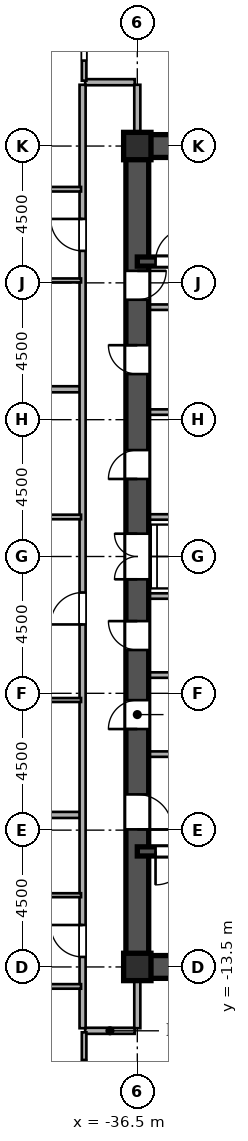
"""IFC4 building model, lengths in metres.
Left out: names, types, materials, properties, quantities, classifications, styles, units other than length and angle.
Written with IfcOpenShell. Run it as: python <this file> out.ifc"""

import sys

from ifc_helpers import new_model, si_unit, direction, frame, frame_2d, origin, origin_2d, place, context, subcontext, project, spatial, rectangle, i_section, extrude, source, transform, mapped, element, fill, save


model = new_model("IFC4")
c1 = context("Model", 3, precision=1e-05, world=origin(), true_north=direction((0.0, 1.0)))
c2 = subcontext(c1, "Body", "Model", "MODEL_VIEW")
j1 = project(units=[si_unit("LENGTHUNIT", "METRE"), si_unit("PLANEANGLEUNIT", "RADIAN")], contexts=[c1])
p1 = place(None, origin())
s1 = spatial("IfcSite", under=j1, at=p1, CompositionType="ELEMENT")
p2 = place(p1, origin())
s2 = spatial("IfcBuilding", under=s1, at=p2, CompositionType="ELEMENT")
p3 = place(p2, frame((0.0, 0.0, 51.3)))
s3 = spatial("IfcBuildingStorey", under=s2, at=p3, CompositionType="ELEMENT", Elevation=51.3)
m1 = source(origin(), c2, "Body", "SweptSolid", [
    extrude(i_section(OverallWidth=0.9, OverallDepth=0.9, WebThickness=0.036, FlangeThickness=0.055, at=origin_2d()), origin(), (0.0, 0.0, 1.0), 3.6),
])
for number, where, z_axis, x_axis in (
    (1, (-36.5, -13.5, 0.0), (0.0, 0.0, 1.0), (1.0, 0.0, 0.0)),
    (2, (-36.5, 13.5, 0.0), (0.0, 0.0, 1.0), (1.0, 0.0, 0.0)),
):
    element("IfcColumn", number, at=place(p3, frame(where, z_axis=z_axis, x_axis=x_axis)), inside=s3, PredefinedType="COLUMN", context=c2, shape_type="MappedRepresentation", body=[
        mapped(m1, transform((0.0, 0.0, 0.0), scale=1.0)),
    ])
for number, where, z_axis, x_axis in (
    (3, (-36.5, -13.5, 0.0), (0.0, 0.0, 1.0), (1.0, 0.0, 0.0)),
    (4, (-36.5, 13.5, 0.0), (0.0, 0.0, 1.0), (1.0, 0.0, 0.0)),
):
    element("IfcWall", number, at=place(p3, frame(where, z_axis=z_axis, x_axis=x_axis)), inside=s3, PredefinedType="SHEAR", context=c2, shape_type="SweptSolid", body=[
        extrude(rectangle(XDim=9.0, YDim=0.75, at=frame_2d((4.5, 0.0))), origin(), (0.0, 0.0, 1.0), 3.38),
    ])
p4 = place(p3, frame((-36.5, -13.65, 0.0), z_axis=(0.0, 0.0, 1.0), x_axis=(0.0, 1.0, 0.0)))
e5 = element("IfcWall", 5, at=p4, inside=s3, PredefinedType="SHEAR", context=c2, shape_type="SweptSolid", body=[
    extrude(rectangle(XDim=7.15, YDim=0.75, at=frame_2d((3.575, 0.0))), origin(), (0.0, 0.0, 1.0), 3.38),
])
p5 = place(p4, frame((4.675, 0.0, 0.0)))
e6 = element("IfcOpeningElement", 6, at=p5, cuts=e5, PredefinedType="OPENING", context=c2, shape_type="SweptSolid", body=[
    extrude(rectangle(XDim=1.15, YDim=2.2, at=frame_2d((0.575, 1.1))), frame((0.0, 0.385, 0.0), z_axis=(0.0, -1.0, 0.0), x_axis=(1.0, 0.0, 0.0)), (0.0, 0.0, 1.0), 0.77),
])
p6 = place(p3, frame((-36.5, -1.3, 0.0), z_axis=(0.0, 0.0, 1.0), x_axis=(0.0, 1.0, 0.0)))
e7 = element("IfcWall", 7, at=p6, inside=s3, PredefinedType="SHEAR", context=c2, shape_type="SweptSolid", body=[
    extrude(rectangle(XDim=2.6, YDim=0.75, at=frame_2d((1.3, 0.0))), origin(), (0.0, 0.0, 1.0), 3.38),
])
p7 = place(p6, frame((0.55, 0.0, 0.0)))
e8 = element("IfcOpeningElement", 8, at=p7, cuts=e7, PredefinedType="OPENING", context=c2, shape_type="SweptSolid", body=[
    extrude(rectangle(XDim=1.5, YDim=2.3, at=frame_2d((0.75, 1.15))), frame((0.0, 0.385, 0.0), z_axis=(0.0, -1.0, 0.0), x_axis=(1.0, 0.0, 0.0)), (0.0, 0.0, 1.0), 0.77),
])
p8 = place(p3, frame((-36.5, 8.2, 0.0), z_axis=(0.0, 0.0, 1.0), x_axis=(0.0, 1.0, 0.0)))
e9 = element("IfcWall", 9, at=p8, inside=s3, PredefinedType="SHEAR", context=c2, shape_type="SweptSolid", body=[
    extrude(rectangle(XDim=5.45, YDim=0.75, at=frame_2d((2.725, 0.0))), origin(), (0.0, 0.0, 1.0), 3.38),
])
p9 = place(p8, frame((0.245, 0.0, 0.0)))
e10 = element("IfcOpeningElement", 10, at=p9, cuts=e9, PredefinedType="OPENING", context=c2, shape_type="SweptSolid", body=[
    extrude(rectangle(XDim=0.95, YDim=2.15, at=frame_2d((0.475, 1.075))), frame((0.0, 0.385, 0.0), z_axis=(0.0, -1.0, 0.0), x_axis=(1.0, 0.0, 0.0)), (0.0, 0.0, 1.0), 0.77),
])
p10 = place(p3, frame((-36.5, -6.5, 0.0), z_axis=(0.0, 0.0, 1.0), x_axis=(0.0, 1.0, 0.0)))
e11 = element("IfcWall", 11, at=p10, inside=s3, PredefinedType="SHEAR", context=c2, shape_type="SweptSolid", body=[
    extrude(rectangle(XDim=2.6, YDim=0.75, at=frame_2d((1.3, 0.0))), origin(), (0.0, 0.0, 1.0), 3.38),
])
p11 = place(p10, frame((0.825, 0.0, 0.0)))
e12 = element("IfcOpeningElement", 12, at=p11, cuts=e11, PredefinedType="OPENING", context=c2, shape_type="SweptSolid", body=[
    extrude(rectangle(XDim=0.95, YDim=2.15, at=frame_2d((0.475, 1.075))), frame((0.0, 0.385, 0.0), z_axis=(0.0, -1.0, 0.0), x_axis=(1.0, 0.0, 0.0)), (0.0, 0.0, 1.0), 0.77),
])
p12 = place(p3, frame((-36.5, -3.9, 0.0), z_axis=(0.0, 0.0, 1.0), x_axis=(0.0, 1.0, 0.0)))
e13 = element("IfcWall", 13, at=p12, inside=s3, PredefinedType="SHEAR", context=c2, shape_type="SweptSolid", body=[
    extrude(rectangle(XDim=2.6, YDim=0.75, at=frame_2d((1.3, 0.0))), origin(), (0.0, 0.0, 1.0), 3.38),
])
p13 = place(p12, frame((0.825, 0.0, 0.0)))
e14 = element("IfcOpeningElement", 14, at=p13, cuts=e13, PredefinedType="OPENING", context=c2, shape_type="SweptSolid", body=[
    extrude(rectangle(XDim=0.95, YDim=2.15, at=frame_2d((0.475, 1.075))), frame((0.0, 0.385, 0.0), z_axis=(0.0, -1.0, 0.0), x_axis=(1.0, 0.0, 0.0)), (0.0, 0.0, 1.0), 0.77),
])
p14 = place(p3, frame((-36.5, 1.3, 0.0), z_axis=(0.0, 0.0, 1.0), x_axis=(0.0, 1.0, 0.0)))
e15 = element("IfcWall", 15, at=p14, inside=s3, PredefinedType="SHEAR", context=c2, shape_type="SweptSolid", body=[
    extrude(rectangle(XDim=3.45, YDim=0.75, at=frame_2d((1.725, 0.0))), origin(), (0.0, 0.0, 1.0), 3.38),
])
p15 = place(p14, frame((1.25, 0.0, 0.0)))
e16 = element("IfcOpeningElement", 16, at=p15, cuts=e15, PredefinedType="OPENING", context=c2, shape_type="SweptSolid", body=[
    extrude(rectangle(XDim=0.95, YDim=2.15, at=frame_2d((0.475, 1.075))), frame((0.0, 0.385, 0.0), z_axis=(0.0, -1.0, 0.0), x_axis=(1.0, 0.0, 0.0)), (0.0, 0.0, 1.0), 0.77),
])
p16 = place(p3, frame((-36.5, 4.75, 0.0), z_axis=(0.0, 0.0, 1.0), x_axis=(0.0, 1.0, 0.0)))
e17 = element("IfcWall", 17, at=p16, inside=s3, PredefinedType="SHEAR", context=c2, shape_type="SweptSolid", body=[
    extrude(rectangle(XDim=3.45, YDim=0.75, at=frame_2d((1.725, 0.0))), origin(), (0.0, 0.0, 1.0), 3.38),
])
p17 = place(p16, frame((1.25, 0.0, 0.0)))
e18 = element("IfcOpeningElement", 18, at=p17, cuts=e17, PredefinedType="OPENING", context=c2, shape_type="SweptSolid", body=[
    extrude(rectangle(XDim=0.95, YDim=2.15, at=frame_2d((0.475, 1.075))), frame((0.0, 0.385, 0.0), z_axis=(0.0, -1.0, 0.0), x_axis=(1.0, 0.0, 0.0)), (0.0, 0.0, 1.0), 0.77),
])
p18 = place(p3, frame((-36.5, -9.7, 0.0), z_axis=(0.0, 0.0, 1.0), x_axis=(1.0, 0.0, 0.0)))
e19 = element("IfcWall", 19, at=p18, inside=s3, PredefinedType="SHEAR", context=c2, shape_type="SweptSolid", body=[
    extrude(rectangle(XDim=9.0, YDim=0.3, at=frame_2d((4.5, 0.0))), origin(), (0.0, 0.0, 1.0), 3.38),
])
p19 = place(p18, frame((0.6, 0.0, 0.0)))
e20 = element("IfcOpeningElement", 20, at=p19, cuts=e19, PredefinedType="OPENING", context=c2, shape_type="SweptSolid", body=[
    extrude(rectangle(XDim=1.1, YDim=2.2, at=frame_2d((0.55, 1.1))), frame((0.0, 0.16, 0.0), z_axis=(0.0, -1.0, 0.0), x_axis=(1.0, 0.0, 0.0)), (0.0, 0.0, 1.0), 0.32),
])
p20 = place(p3, frame((-36.5, 9.7, 0.0), z_axis=(0.0, 0.0, 1.0), x_axis=(1.0, 0.0, 0.0)))
e21 = element("IfcWall", 21, at=p20, inside=s3, PredefinedType="SHEAR", context=c2, shape_type="SweptSolid", body=[
    extrude(rectangle(XDim=9.0, YDim=0.3, at=frame_2d((4.5, 0.0))), origin(), (0.0, 0.0, 1.0), 3.38),
])
p21 = place(p20, frame((0.6, 0.0, 0.0)))
e22 = element("IfcOpeningElement", 22, at=p21, cuts=e21, PredefinedType="OPENING", context=c2, shape_type="SweptSolid", body=[
    extrude(rectangle(XDim=1.1, YDim=2.2, at=frame_2d((0.55, 1.1))), frame((0.0, 0.16, 0.0), z_axis=(0.0, -1.0, 0.0), x_axis=(1.0, 0.0, 0.0)), (0.0, 0.0, 1.0), 0.32),
])
for number, where, z_axis, x_axis in (
    (23, (-36.15, -6.5, 0.0), (0.0, 0.0, 1.0), (1.0, 0.0, 0.0)),
    (24, (-36.15, 8.2, 0.0), (0.0, 0.0, 1.0), (1.0, 0.0, 0.0)),
):
    element("IfcWall", number, at=place(p3, frame(where, z_axis=z_axis, x_axis=x_axis)), inside=s3, PredefinedType="PARTITIONING", context=c2, shape_type="SweptSolid", body=[
        extrude(rectangle(XDim=5.7, YDim=0.18, at=frame_2d((2.85, 0.0))), origin(), (0.0, 0.0, 1.0), 3.38),
    ])
for number, where, z_axis, x_axis in (
    (25, (-36.15, -1.3, 0.0), (0.0, 0.0, 1.0), (1.0, 0.0, 0.0)),
    (26, (-36.15, 1.3, 0.0), (0.0, 0.0, 1.0), (1.0, 0.0, 0.0)),
    (27, (-36.15, -3.9, 0.0), (0.0, 0.0, 1.0), (1.0, 0.0, 0.0)),
    (28, (-36.15, 4.75, 0.0), (0.0, 0.0, 1.0), (1.0, 0.0, 0.0)),
):
    element("IfcWall", number, at=place(p3, frame(where, z_axis=z_axis, x_axis=x_axis)), inside=s3, PredefinedType="PARTITIONING", context=c2, shape_type="SweptSolid", body=[
        extrude(rectangle(XDim=2.95, YDim=0.18, at=frame_2d((1.475, 0.0))), origin(), (0.0, 0.0, 1.0), 3.38),
    ])
p22 = place(p3, frame((-38.215, -15.6, 0.0), z_axis=(0.0, 0.0, 1.0), x_axis=(1.0, 0.0, 0.0)))
e29 = element("IfcWall", 29, at=p22, inside=s3, PredefinedType="PARTITIONING", context=c2, shape_type="SweptSolid", body=[
    extrude(rectangle(XDim=1.63, YDim=0.2, at=frame_2d((0.815, 0.0))), origin(), (0.0, 0.0, 1.0), 3.38),
])
p23 = place(p3, frame((-44.45, -14.14, 0.0), z_axis=(0.0, 0.0, 1.0), x_axis=(1.0, 0.0, 0.0)))
e30 = element("IfcWall", 30, at=p23, inside=s3, PredefinedType="PARTITIONING", context=c2, shape_type="SweptSolid", body=[
    extrude(rectangle(XDim=6.1, YDim=0.15, at=frame_2d((3.05, 0.0))), origin(), (0.0, 0.0, 1.0), 3.38),
])
p24 = place(p23, frame((2.575, 0.0, 0.0)))
e31 = element("IfcOpeningElement", 31, at=p24, cuts=e30, PredefinedType="OPENING", context=c2, shape_type="SweptSolid", body=[
    extrude(rectangle(XDim=0.95, YDim=2.15, at=frame_2d((0.475, 1.075))), frame((0.0, 0.085, 0.0), z_axis=(0.0, -1.0, 0.0), x_axis=(1.0, 0.0, 0.0)), (0.0, 0.0, 1.0), 0.17),
])
p25 = place(p3, frame((-44.45, -11.14, 0.0), z_axis=(0.0, 0.0, 1.0), x_axis=(1.0, 0.0, 0.0)))
e32 = element("IfcWall", 32, at=p25, inside=s3, PredefinedType="PARTITIONING", context=c2, shape_type="SweptSolid", body=[
    extrude(rectangle(XDim=6.1, YDim=0.13, at=frame_2d((3.05, 0.0))), origin(), (0.0, 0.0, 1.0), 3.38),
])
p26 = place(p25, frame((2.61, 0.0, 0.0)))
e33 = element("IfcOpeningElement", 33, at=p26, cuts=e32, PredefinedType="OPENING", context=c2, shape_type="SweptSolid", body=[
    extrude(rectangle(XDim=0.88, YDim=2.1, at=frame_2d((0.44, 1.05))), frame((0.0, 0.075, 0.0), z_axis=(0.0, -1.0, 0.0), x_axis=(1.0, 0.0, 0.0)), (0.0, 0.0, 1.0), 0.15),
])
p27 = place(p3, frame((-72.505, -8.5, 0.0), z_axis=(0.0, 0.0, 1.0), x_axis=(1.0, 0.0, 0.0)))
e34 = element("IfcWall", 34, at=p27, inside=s3, PredefinedType="PARTITIONING", context=c2, shape_type="SweptSolid", body=[
    extrude(rectangle(XDim=34.125, YDim=0.2, at=frame_2d((17.062, 0.0))), origin(), (0.0, 0.0, 1.0), 3.38),
])
p28 = place(p3, frame((-44.45, -4.72, 0.0), z_axis=(0.0, 0.0, 1.0), x_axis=(1.0, 0.0, 0.0)))
e35 = element("IfcWall", 35, at=p28, inside=s3, PredefinedType="PARTITIONING", context=c2, shape_type="SweptSolid", body=[
    extrude(rectangle(XDim=6.1, YDim=0.13, at=frame_2d((3.05, 0.0))), origin(), (0.0, 0.0, 1.0), 3.38),
])
p29 = place(p28, frame((2.61, 0.0, 0.0)))
e36 = element("IfcOpeningElement", 36, at=p29, cuts=e35, PredefinedType="OPENING", context=c2, shape_type="SweptSolid", body=[
    extrude(rectangle(XDim=0.88, YDim=2.1, at=frame_2d((0.44, 1.05))), frame((0.0, 0.075, 0.0), z_axis=(0.0, -1.0, 0.0), x_axis=(1.0, 0.0, 0.0)), (0.0, 0.0, 1.0), 0.15),
])
p30 = place(p3, frame((-44.45, 1.3, 0.0), z_axis=(0.0, 0.0, 1.0), x_axis=(1.0, 0.0, 0.0)))
e37 = element("IfcWall", 37, at=p30, inside=s3, PredefinedType="PARTITIONING", context=c2, shape_type="SweptSolid", body=[
    extrude(rectangle(XDim=6.1, YDim=0.15, at=frame_2d((3.05, 0.0))), origin(), (0.0, 0.0, 1.0), 3.38),
])
p31 = place(p30, frame((2.575, 0.0, 0.0)))
e38 = element("IfcOpeningElement", 38, at=p31, cuts=e37, PredefinedType="OPENING", context=c2, shape_type="SweptSolid", body=[
    extrude(rectangle(XDim=0.95, YDim=2.15, at=frame_2d((0.475, 1.075))), frame((0.0, 0.085, 0.0), z_axis=(0.0, -1.0, 0.0), x_axis=(1.0, 0.0, 0.0)), (0.0, 0.0, 1.0), 0.17),
])
p32 = place(p3, frame((-72.505, 5.5, 0.0), z_axis=(0.0, 0.0, 1.0), x_axis=(1.0, 0.0, 0.0)))
e39 = element("IfcWall", 39, at=p32, inside=s3, PredefinedType="PARTITIONING", context=c2, shape_type="SweptSolid", body=[
    extrude(rectangle(XDim=34.125, YDim=0.2, at=frame_2d((17.062, 0.0))), origin(), (0.0, 0.0, 1.0), 3.38),
])
p33 = place(p3, frame((-44.45, 9.08, 0.0), z_axis=(0.0, 0.0, 1.0), x_axis=(1.0, 0.0, 0.0)))
e40 = element("IfcWall", 40, at=p33, inside=s3, PredefinedType="PARTITIONING", context=c2, shape_type="SweptSolid", body=[
    extrude(rectangle(XDim=6.1, YDim=0.13, at=frame_2d((3.05, 0.0))), origin(), (0.0, 0.0, 1.0), 3.38),
])
p34 = place(p33, frame((2.61, 0.0, 0.0)))
e41 = element("IfcOpeningElement", 41, at=p34, cuts=e40, PredefinedType="OPENING", context=c2, shape_type="SweptSolid", body=[
    extrude(rectangle(XDim=0.88, YDim=2.1, at=frame_2d((0.44, 1.05))), frame((0.0, 0.075, 0.0), z_axis=(0.0, -1.0, 0.0), x_axis=(1.0, 0.0, 0.0)), (0.0, 0.0, 1.0), 0.15),
])
p35 = place(p3, frame((-44.45, 12.08, 0.0), z_axis=(0.0, 0.0, 1.0), x_axis=(1.0, 0.0, 0.0)))
e42 = element("IfcWall", 42, at=p35, inside=s3, PredefinedType="PARTITIONING", context=c2, shape_type="SweptSolid", body=[
    extrude(rectangle(XDim=6.1, YDim=0.15, at=frame_2d((3.05, 0.0))), origin(), (0.0, 0.0, 1.0), 3.38),
])
p36 = place(p35, frame((2.575, 0.0, 0.0)))
e43 = element("IfcOpeningElement", 43, at=p36, cuts=e42, PredefinedType="OPENING", context=c2, shape_type="SweptSolid", body=[
    extrude(rectangle(XDim=0.95, YDim=2.15, at=frame_2d((0.475, 1.075))), frame((0.0, 0.085, 0.0), z_axis=(0.0, -1.0, 0.0), x_axis=(1.0, 0.0, 0.0)), (0.0, 0.0, 1.0), 0.17),
])
p37 = place(p3, frame((-38.215, 15.6, 0.0), z_axis=(0.0, 0.0, 1.0), x_axis=(1.0, 0.0, 0.0)))
e44 = element("IfcWall", 44, at=p37, inside=s3, PredefinedType="PARTITIONING", context=c2, shape_type="SweptSolid", body=[
    extrude(rectangle(XDim=1.63, YDim=0.2, at=frame_2d((0.815, 0.0))), origin(), (0.0, 0.0, 1.0), 3.38),
])
p38 = place(p3, frame((-38.3, -15.515, 0.0), z_axis=(0.0, 0.0, 1.0), x_axis=(0.0, 1.0, 0.0)))
e45 = element("IfcWall", 45, at=p38, inside=s3, PredefinedType="PARTITIONING", context=c2, shape_type="SweptSolid", body=[
    extrude(rectangle(XDim=31.03, YDim=0.2, at=frame_2d((15.515, 0.0))), origin(), (0.0, 0.0, 1.0), 3.38),
])
p39 = place(p38, frame((2.345, 0.0, 0.0)))
e46 = element("IfcOpeningElement", 46, at=p39, cuts=e45, PredefinedType="OPENING", context=c2, shape_type="SweptSolid", body=[
    extrude(rectangle(XDim=1.05, YDim=2.25, at=frame_2d((0.525, 1.125))), frame((0.0, 0.11, 0.0), z_axis=(0.0, -1.0, 0.0), x_axis=(1.0, 0.0, 0.0)), (0.0, 0.0, 1.0), 0.22),
])
p40 = place(p38, frame((13.28, 0.0, 0.0)))
e47 = element("IfcOpeningElement", 47, at=p40, cuts=e45, PredefinedType="OPENING", context=c2, shape_type="SweptSolid", body=[
    extrude(rectangle(XDim=1.05, YDim=2.25, at=frame_2d((0.525, 1.125))), frame((0.0, 0.11, 0.0), z_axis=(0.0, -1.0, 0.0), x_axis=(1.0, 0.0, 0.0)), (0.0, 0.0, 1.0), 0.22),
])
p41 = place(p38, frame((25.567, 0.0, 0.0)))
e48 = element("IfcOpeningElement", 48, at=p41, cuts=e45, PredefinedType="OPENING", context=c2, shape_type="SweptSolid", body=[
    extrude(rectangle(XDim=1.05, YDim=2.25, at=frame_2d((0.525, 1.125))), frame((0.0, 0.11, 0.0), z_axis=(0.0, -1.0, 0.0), x_axis=(1.0, 0.0, 0.0)), (0.0, 0.0, 1.0), 0.22),
])
p42 = place(p3, frame((-38.25, -23.898, 0.0), z_axis=(0.0, 0.0, 1.0), x_axis=(0.0, 1.0, 0.0)))
e49 = element("IfcWall", 49, at=p42, inside=s3, PredefinedType="PARTITIONING", context=c2, shape_type="SweptSolid", body=[
    extrude(rectangle(XDim=8.248, YDim=0.15, at=frame_2d((4.124, 0.0))), origin(), (0.0, 0.0, 1.0), 3.38),
])
p43 = place(p42, frame((6.391, 0.0, 0.0)))
e50 = element("IfcOpeningElement", 50, at=p43, cuts=e49, PredefinedType="OPENING", context=c2, shape_type="SweptSolid", body=[
    extrude(rectangle(XDim=0.95, YDim=2.15, at=frame_2d((0.475, 1.075))), frame((0.0, 0.085, 0.0), z_axis=(0.0, -1.0, 0.0), x_axis=(1.0, 0.0, 0.0)), (0.0, 0.0, 1.0), 0.17),
])
p44 = place(p3, frame((-38.25, 15.65, 0.0), z_axis=(0.0, 0.0, 1.0), x_axis=(0.0, 1.0, 0.0)))
e51 = element("IfcWall", 51, at=p44, inside=s3, PredefinedType="PARTITIONING", context=c2, shape_type="SweptSolid", body=[
    extrude(rectangle(XDim=8.248, YDim=0.15, at=frame_2d((4.124, 0.0))), origin(), (0.0, 0.0, 1.0), 3.38),
])
p45 = place(p44, frame((0.66, 0.0, 0.0)))
e52 = element("IfcOpeningElement", 52, at=p45, cuts=e51, PredefinedType="OPENING", context=c2, shape_type="SweptSolid", body=[
    extrude(rectangle(XDim=0.95, YDim=2.15, at=frame_2d((0.475, 1.075))), frame((0.0, 0.085, 0.0), z_axis=(0.0, -1.0, 0.0), x_axis=(1.0, 0.0, 0.0)), (0.0, 0.0, 1.0), 0.17),
])
p46 = place(p44, frame((2.985, 0.0, 0.0)))
e53 = element("IfcOpeningElement", 53, at=p46, cuts=e51, PredefinedType="OPENING", context=c2, shape_type="SweptSolid", body=[
    extrude(rectangle(XDim=0.95, YDim=2.15, at=frame_2d((0.475, 1.075))), frame((0.0, 0.085, 0.0), z_axis=(0.0, -1.0, 0.0), x_axis=(1.0, 0.0, 0.0)), (0.0, 0.0, 1.0), 0.17),
])
for number, where, z_axis, x_axis in (
    (54, (-36.5, -15.515, 0.0), (0.0, 0.0, 1.0), (0.0, 1.0, 0.0)),
    (55, (-36.5, 13.88, 0.0), (0.0, 0.0, 1.0), (0.0, 1.0, 0.0)),
):
    element("IfcWall", number, at=place(p3, frame(where, z_axis=z_axis, x_axis=x_axis)), inside=s3, PredefinedType="PARTITIONING", context=c2, shape_type="SweptSolid", body=[
        extrude(rectangle(XDim=1.635, YDim=0.2, at=frame_2d((0.817, 0.0))), origin(), (0.0, 0.0, 1.0), 2.68),
    ])
m2 = source(origin(), c2, "Body", "SweptSolid", [
    extrude(rectangle(XDim=1.15, YDim=2.2, at=frame_2d((0.575, 1.1))), frame((0.0, 0.025, 0.0), z_axis=(0.0, -1.0, 0.0), x_axis=(1.0, 0.0, 0.0)), (0.0, 0.0, 1.0), 0.05),
])
p47 = place(p5, frame((1.15, 0.0, 0.0), z_axis=(0.0, 0.0, 1.0), x_axis=(-1.0, 0.0, 0.0)))
e56 = element("IfcDoor", 56, at=p47, inside=s3, OperationType="SINGLE_SWING_LEFT", PredefinedType="DOOR", context=c2, shape_type="MappedRepresentation", body=[
    mapped(m2, transform((0.0, 0.0, 0.0), scale=1.0)),
])
fill(e6, e56)
m3 = source(origin(), c2, "Body", "SweptSolid", [
    extrude(rectangle(XDim=1.5, YDim=2.3, at=frame_2d((0.75, 1.15))), frame((0.0, 0.025, 0.0), z_axis=(0.0, -1.0, 0.0), x_axis=(1.0, 0.0, 0.0)), (0.0, 0.0, 1.0), 0.05),
])
p48 = place(p7, origin())
e57 = element("IfcDoor", 57, at=p48, inside=s3, OperationType="DOUBLE_SWING_LEFT", PredefinedType="DOOR", context=c2, shape_type="MappedRepresentation", body=[
    mapped(m3, transform((0.0, 0.0, 0.0), scale=1.0)),
])
fill(e8, e57)
m4 = source(origin(), c2, "Body", "SweptSolid", [
    extrude(rectangle(XDim=0.95, YDim=2.15, at=frame_2d((0.475, 1.075))), frame((0.0, 0.025, 0.0), z_axis=(0.0, -1.0, 0.0), x_axis=(1.0, 0.0, 0.0)), (0.0, 0.0, 1.0), 0.05),
])
p49 = place(p9, frame((0.95, 0.0, 0.0), z_axis=(0.0, 0.0, 1.0), x_axis=(-1.0, 0.0, 0.0)))
e58 = element("IfcDoor", 58, at=p49, inside=s3, OperationType="SINGLE_SWING_RIGHT", PredefinedType="DOOR", context=c2, shape_type="MappedRepresentation", body=[
    mapped(m4, transform((0.0, 0.0, 0.0), scale=1.0)),
])
fill(e10, e58)
p50 = place(p11, origin())
e59 = element("IfcDoor", 59, at=p50, inside=s3, OperationType="SINGLE_SWING_LEFT", PredefinedType="DOOR", context=c2, shape_type="MappedRepresentation", body=[
    mapped(m4, transform((0.0, 0.0, 0.0), scale=1.0)),
])
fill(e12, e59)
p51 = place(p13, origin())
e60 = element("IfcDoor", 60, at=p51, inside=s3, OperationType="SINGLE_SWING_RIGHT", PredefinedType="DOOR", context=c2, shape_type="MappedRepresentation", body=[
    mapped(m4, transform((0.0, 0.0, 0.0), scale=1.0)),
])
fill(e14, e60)
p52 = place(p15, origin())
e61 = element("IfcDoor", 61, at=p52, inside=s3, OperationType="SINGLE_SWING_LEFT", PredefinedType="DOOR", context=c2, shape_type="MappedRepresentation", body=[
    mapped(m4, transform((0.0, 0.0, 0.0), scale=1.0)),
])
fill(e16, e61)
p53 = place(p17, origin())
e62 = element("IfcDoor", 62, at=p53, inside=s3, OperationType="SINGLE_SWING_RIGHT", PredefinedType="DOOR", context=c2, shape_type="MappedRepresentation", body=[
    mapped(m4, transform((0.0, 0.0, 0.0), scale=1.0)),
])
fill(e18, e62)
m5 = source(origin(), c2, "Body", "SweptSolid", [
    extrude(rectangle(XDim=1.1, YDim=2.2, at=frame_2d((0.55, 1.1))), frame((0.0, 0.025, 0.0), z_axis=(0.0, -1.0, 0.0), x_axis=(1.0, 0.0, 0.0)), (0.0, 0.0, 1.0), 0.05),
])
p54 = place(p19, frame((1.1, 0.0, 0.0), z_axis=(0.0, 0.0, 1.0), x_axis=(-1.0, 0.0, 0.0)))
e63 = element("IfcDoor", 63, at=p54, inside=s3, OperationType="SINGLE_SWING_LEFT", PredefinedType="DOOR", context=c2, shape_type="MappedRepresentation", body=[
    mapped(m5, transform((0.0, 0.0, 0.0), scale=1.0)),
])
fill(e20, e63)
p55 = place(p21, origin())
e64 = element("IfcDoor", 64, at=p55, inside=s3, OperationType="SINGLE_SWING_RIGHT", PredefinedType="DOOR", context=c2, shape_type="MappedRepresentation", body=[
    mapped(m5, transform((0.0, 0.0, 0.0), scale=1.0)),
])
fill(e22, e64)
m6 = source(origin(), c2, "Body", "SweptSolid", [
    extrude(rectangle(XDim=1.05, YDim=2.25, at=frame_2d((0.525, 1.125))), frame((0.0, 0.025, 0.0), z_axis=(0.0, -1.0, 0.0), x_axis=(1.0, 0.0, 0.0)), (0.0, 0.0, 1.0), 0.05),
])
p56 = place(p39, origin())
e65 = element("IfcDoor", 65, at=p56, inside=s3, OperationType="SINGLE_SWING_RIGHT", PredefinedType="DOOR", context=c2, shape_type="MappedRepresentation", body=[
    mapped(m6, transform((0.0, 0.0, 0.0), scale=1.0)),
])
fill(e46, e65)
p57 = place(p40, origin())
e66 = element("IfcDoor", 66, at=p57, inside=s3, OperationType="SINGLE_SWING_LEFT", PredefinedType="DOOR", context=c2, shape_type="MappedRepresentation", body=[
    mapped(m6, transform((0.0, 0.0, 0.0), scale=1.0)),
])
fill(e47, e66)
p58 = place(p41, origin())
e67 = element("IfcDoor", 67, at=p58, inside=s3, OperationType="SINGLE_SWING_RIGHT", PredefinedType="DOOR", context=c2, shape_type="MappedRepresentation", body=[
    mapped(m6, transform((0.0, 0.0, 0.0), scale=1.0)),
])
fill(e48, e67)
save(model, sys.argv[1])
